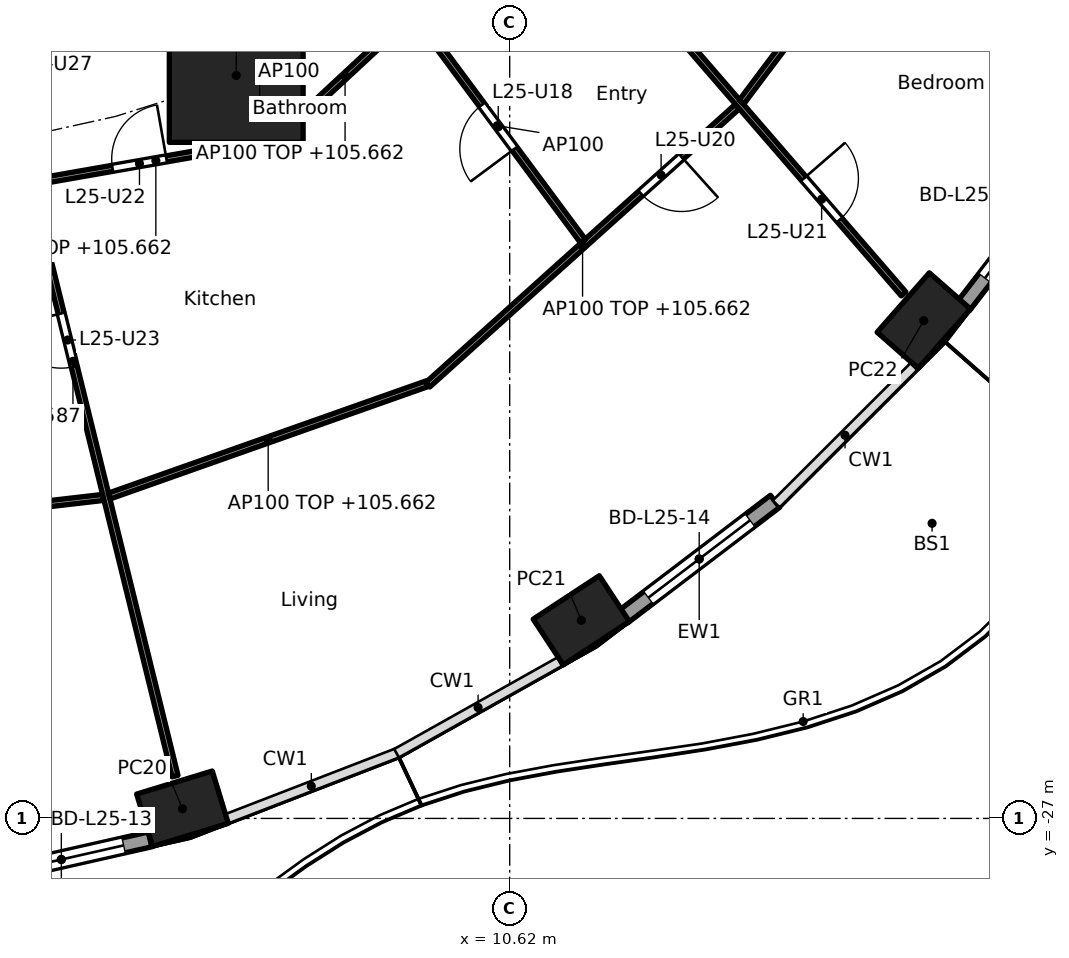
"""IFC4 building model, lengths in metres.
Left out: names, types, materials, properties, quantities, classifications, styles, units other than length and angle.
Written with IfcOpenShell. Run it as: python <this file> out.ifc"""

import sys

from ifc_helpers import new_model, si_unit, direction, frame, frame_2d, origin, origin_2d, place, context, subcontext, project, spatial, rectangle, hollow_rectangle, extrude, element, fill, save


model = new_model("IFC4")
c1 = context("Model", 3, precision=1e-05, world=origin(), true_north=direction((0.0, 1.0)))
c2 = subcontext(c1, "Body", "Model", "MODEL_VIEW")
j1 = project(units=[si_unit("LENGTHUNIT", "METRE"), si_unit("PLANEANGLEUNIT", "RADIAN")], contexts=[c1])
p1 = place(None, origin())
s1 = spatial("IfcSite", under=j1, at=p1, CompositionType="ELEMENT")
p2 = place(p1, origin())
s2 = spatial("IfcBuilding", under=s1, at=p2, CompositionType="ELEMENT")
p3 = place(p2, frame((0.0, 0.0, 102.9)))
s3 = spatial("IfcBuildingStorey", under=s2, at=p3, CompositionType="ELEMENT", Elevation=102.9)
for number, where, z_axis, x_axis in (
    (1, (5.239, -26.841, 0.0), (0.0, 0.0, 1.0), (0.957, 0.292, 0.0)),
    (2, (11.798, -23.742, 0.0), (0.0, 0.0, 1.0), (0.836, 0.549, 0.0)),
    (3, (17.43, -18.813, 0.0), (0.0, 0.0, 1.0), (0.66, 0.751, 0.0)),
):
    element("IfcColumn", number, at=place(p3, frame(where, z_axis=z_axis, x_axis=x_axis)), inside=s3, PredefinedType="COLUMN", context=c2, shape_type="SweptSolid", body=[
        extrude(hollow_rectangle(XDim=1.3, YDim=0.9, WallThickness=0.045, at=origin_2d()), origin(), (0.0, 0.0, 1.0), 3.7),
    ])
p4 = place(p3, frame((6.123, -14.782, 0.0), z_axis=(0.0, 0.0, 1.0), x_axis=(1.0, 0.0, 0.0)))
e4 = element("IfcColumn", 4, at=p4, inside=s3, PredefinedType="COLUMN", context=c2, shape_type="SweptSolid", body=[
    extrude(rectangle(XDim=2.2, YDim=2.2, at=origin_2d()), origin(), (0.0, 0.0, 1.0), 3.7),
])
p5 = place(p3, frame((4.707, -27.345, 0.0), z_axis=(0.0, 0.0, 1.0), x_axis=(-0.975317607872, -0.220806620767, 0.0)))
e5 = element("IfcWall", 5, at=p5, inside=s3, PredefinedType="SOLIDWALL", context=c2, shape_type="SweptSolid", body=[
    extrude(rectangle(XDim=2.993, YDim=0.25, at=frame_2d((1.497, 0.0))), origin(), (0.0, 0.0, 1.0), 3.44),
])
p6 = place(p5, frame((0.447, 0.0, 0.0)))
e6 = element("IfcOpeningElement", 6, at=p6, cuts=e5, PredefinedType="OPENING", context=c2, shape_type="SweptSolid", body=[
    extrude(rectangle(XDim=2.1, YDim=2.4, at=frame_2d((1.05, 1.2))), frame((0.0, 0.135, 0.0), z_axis=(0.0, -1.0, 0.0), x_axis=(1.0, 0.0, 0.0)), (0.0, 0.0, 1.0), 0.27),
])
p7 = place(p3, frame((14.984, -21.785, 0.0), z_axis=(0.0, 0.0, 1.0), x_axis=(-0.796037575978, -0.605247203736, 0.0)))
e7 = element("IfcWall", 7, at=p7, inside=s3, PredefinedType="SOLIDWALL", context=c2, shape_type="SweptSolid", body=[
    extrude(rectangle(XDim=3.134, YDim=0.25, at=frame_2d((1.567, 0.0))), origin(), (0.0, 0.0, 1.0), 3.44),
])
p8 = place(p7, frame((0.517, 0.0, 0.0)))
e8 = element("IfcOpeningElement", 8, at=p8, cuts=e7, PredefinedType="OPENING", context=c2, shape_type="SweptSolid", body=[
    extrude(rectangle(XDim=2.1, YDim=2.4, at=frame_2d((1.05, 1.2))), frame((0.0, 0.135, 0.0), z_axis=(0.0, -1.0, 0.0), x_axis=(1.0, 0.0, 0.0)), (0.0, 0.0, 1.0), 0.27),
])
p9 = place(p3, frame((20.073, -15.991, 0.0), z_axis=(0.0, 0.0, 1.0), x_axis=(-0.610458970322, -0.792047880847, 0.0)))
e9 = element("IfcWall", 9, at=p9, inside=s3, PredefinedType="SOLIDWALL", context=c2, shape_type="SweptSolid", body=[
    extrude(rectangle(XDim=3.263, YDim=0.25, at=frame_2d((1.631, 0.0))), origin(), (0.0, 0.0, 1.0), 3.44),
])
p10 = place(p9, frame((0.582, 0.0, 0.0)))
e10 = element("IfcOpeningElement", 10, at=p10, cuts=e9, PredefinedType="OPENING", context=c2, shape_type="SweptSolid", body=[
    extrude(rectangle(XDim=2.1, YDim=2.4, at=frame_2d((1.05, 1.2))), frame((0.0, 0.135, 0.0), z_axis=(0.0, -1.0, 0.0), x_axis=(1.0, 0.0, 0.0)), (0.0, 0.0, 1.0), 0.27),
])
p11 = place(p3, frame((-1.726, -22.375, 0.0), z_axis=(0.0, 0.0, 1.0), x_axis=(0.99339223329, 0.114768771187, 0.0)))
e11 = element("IfcWall", 11, at=p11, inside=s3, PredefinedType="PARTITIONING", context=c2, shape_type="SweptSolid", body=[
    extrude(rectangle(XDim=5.701, YDim=0.1, at=frame_2d((2.851, 0.0))), origin(), (0.0, 0.0, 1.0), 2.762),
])
p12 = place(p11, frame((2.4, 0.0, 0.0)))
e12 = element("IfcOpeningElement", 12, at=p12, cuts=e11, PredefinedType="OPENING", context=c2, shape_type="SweptSolid", body=[
    extrude(rectangle(XDim=0.9, YDim=2.1, at=frame_2d((0.45, 1.05))), frame((0.0, 0.06, 0.0), z_axis=(0.0, -1.0, 0.0), x_axis=(1.0, 0.0, 0.0)), (0.0, 0.0, 1.0), 0.12),
])
p13 = place(p3, frame((1.759, -12.662, 0.0), z_axis=(0.0, 0.0, 1.0), x_axis=(0.239021819854, -0.971014196412, 0.0)))
e13 = element("IfcWall", 13, at=p13, inside=s3, PredefinedType="PARTITIONING", context=c2, shape_type="SweptSolid", body=[
    extrude(rectangle(XDim=14.05, YDim=0.1, at=frame_2d((7.025, 0.0))), origin(), (0.0, 0.0, 1.0), 2.687),
])
p14 = place(p13, frame((6.214, 0.0, 0.0)))
e14 = element("IfcOpeningElement", 14, at=p14, cuts=e13, PredefinedType="OPENING", context=c2, shape_type="SweptSolid", body=[
    extrude(rectangle(XDim=0.9, YDim=2.1, at=frame_2d((0.45, 1.05))), frame((0.0, 0.06, 0.0), z_axis=(0.0, -1.0, 0.0), x_axis=(1.0, 0.0, 0.0)), (0.0, 0.0, 1.0), 0.12),
])
p15 = place(p13, frame((1.552, 0.0, 0.0)))
e15 = element("IfcOpeningElement", 15, at=p15, cuts=e13, PredefinedType="OPENING", context=c2, shape_type="SweptSolid", body=[
    extrude(rectangle(XDim=0.9, YDim=2.1, at=frame_2d((0.45, 1.05))), frame((0.0, 0.06, 0.0), z_axis=(0.0, -1.0, 0.0), x_axis=(1.0, 0.0, 0.0)), (0.0, 0.0, 1.0), 0.12),
])
p16 = place(p3, frame((2.765, -16.541, 0.0), z_axis=(0.0, 0.0, 1.0), x_axis=(0.984998612286, 0.172562260633, 0.0)))
e16 = element("IfcWall", 16, at=p16, inside=s3, PredefinedType="PARTITIONING", context=c2, shape_type="SweptSolid", body=[
    extrude(rectangle(XDim=4.134, YDim=0.1, at=frame_2d((2.067, 0.0))), origin(), (0.0, 0.0, 1.0), 2.762),
])
p17 = place(p16, frame((1.344, 0.0, 0.0)))
e17 = element("IfcOpeningElement", 17, at=p17, cuts=e16, PredefinedType="OPENING", context=c2, shape_type="SweptSolid", body=[
    extrude(rectangle(XDim=0.9, YDim=2.1, at=frame_2d((0.45, 1.05))), frame((0.0, 0.06, 0.0), z_axis=(0.0, -1.0, 0.0), x_axis=(1.0, 0.0, 0.0)), (0.0, 0.0, 1.0), 0.12),
])
p18 = place(p3, frame((4.034, -21.698, 0.0), z_axis=(0.0, 0.0, 1.0), x_axis=(0.942864271692, 0.333177077794, 0.0)))
e18 = element("IfcWall", 18, at=p18, inside=s3, PredefinedType="PARTITIONING", context=c2, shape_type="SweptSolid", body=[
    extrude(rectangle(XDim=5.545, YDim=0.1, at=frame_2d((2.772, 0.0))), origin(), (0.0, 0.0, 1.0), 2.762),
])
p19 = place(p3, frame((5.243, -12.657, 0.0), z_axis=(0.0, 0.0, 1.0), x_axis=(0.382719158442, -0.923864733477, 0.0)))
e19 = element("IfcWall", 19, at=p19, inside=s3, PredefinedType="PARTITIONING", context=c2, shape_type="SweptSolid", body=[
    extrude(rectangle(XDim=2.25, YDim=0.1, at=frame_2d((1.125, 0.0))), origin(), (0.0, 0.0, 1.0), 3.44),
])
p20 = place(p3, frame((6.824, -15.802, 0.0), z_axis=(0.0, 0.0, 1.0), x_axis=(0.733007232109, 0.680220844782, 0.0)))
e20 = element("IfcWall", 20, at=p20, inside=s3, PredefinedType="PARTITIONING", context=c2, shape_type="SweptSolid", body=[
    extrude(rectangle(XDim=2.969, YDim=0.1, at=frame_2d((1.485, 0.0))), origin(), (0.0, 0.0, 1.0), 2.762),
])
p21 = place(p3, frame((9.272, -19.868, 0.0), z_axis=(0.0, 0.0, 1.0), x_axis=(0.743884413566, 0.668308296562, 0.0)))
e21 = element("IfcWall", 21, at=p21, inside=s3, PredefinedType="PARTITIONING", context=c2, shape_type="SweptSolid", body=[
    extrude(rectangle(XDim=6.845, YDim=0.1, at=frame_2d((3.423, 0.0))), origin(), (0.0, 0.0, 1.0), 2.762),
])
p22 = place(p21, frame((4.709, 0.0, 0.0)))
e22 = element("IfcOpeningElement", 22, at=p22, cuts=e21, PredefinedType="OPENING", context=c2, shape_type="SweptSolid", body=[
    extrude(rectangle(XDim=0.9, YDim=2.1, at=frame_2d((0.45, 1.05))), frame((0.0, 0.06, 0.0), z_axis=(0.0, -1.0, 0.0), x_axis=(1.0, 0.0, 0.0)), (0.0, 0.0, 1.0), 0.12),
])
p23 = place(p3, frame((9.008, -13.708, 0.0), z_axis=(0.0, 0.0, 1.0), x_axis=(0.595845850207, -0.803098825047, 0.0)))
e23 = element("IfcWall", 23, at=p23, inside=s3, PredefinedType="PARTITIONING", context=c2, shape_type="SweptSolid", body=[
    extrude(rectangle(XDim=4.729, YDim=0.1, at=frame_2d((2.365, 0.0))), origin(), (0.0, 0.0, 1.0), 3.44),
])
p24 = place(p23, frame((1.94, 0.0, 0.0)))
e24 = element("IfcOpeningElement", 24, at=p24, cuts=e23, PredefinedType="OPENING", context=c2, shape_type="SweptSolid", body=[
    extrude(rectangle(XDim=0.9, YDim=2.1, at=frame_2d((0.45, 1.05))), frame((0.0, 0.06, 0.0), z_axis=(0.0, -1.0, 0.0), x_axis=(1.0, 0.0, 0.0)), (0.0, 0.0, 1.0), 0.12),
])
p25 = place(p3, frame((8.95, -8.96, 0.0), z_axis=(0.0, 0.0, 1.0), x_axis=(0.65441081073, -0.756139200676, 0.0)))
e25 = element("IfcWall", 25, at=p25, inside=s3, PredefinedType="PARTITIONING", context=c2, shape_type="SweptSolid", body=[
    extrude(rectangle(XDim=12.451, YDim=0.1, at=frame_2d((6.226, 0.0))), origin(), (0.0, 0.0, 1.0), 2.687),
])
p26 = place(p25, frame((1.336, 0.0, 0.0)))
e26 = element("IfcOpeningElement", 26, at=p26, cuts=e25, PredefinedType="OPENING", context=c2, shape_type="SweptSolid", body=[
    extrude(rectangle(XDim=0.9, YDim=2.1, at=frame_2d((0.45, 1.05))), frame((0.0, 0.06, 0.0), z_axis=(0.0, -1.0, 0.0), x_axis=(1.0, 0.0, 0.0)), (0.0, 0.0, 1.0), 0.12),
])
p27 = place(p25, frame((5.501, 0.0, 0.0)))
e27 = element("IfcOpeningElement", 27, at=p27, cuts=e25, PredefinedType="OPENING", context=c2, shape_type="SweptSolid", body=[
    extrude(rectangle(XDim=0.9, YDim=2.1, at=frame_2d((0.45, 1.05))), frame((0.0, 0.06, 0.0), z_axis=(0.0, -1.0, 0.0), x_axis=(1.0, 0.0, 0.0)), (0.0, 0.0, 1.0), 0.12),
])
p28 = place(p25, frame((9.941, 0.0, 0.0)))
e28 = element("IfcOpeningElement", 28, at=p28, cuts=e25, PredefinedType="OPENING", context=c2, shape_type="SweptSolid", body=[
    extrude(rectangle(XDim=0.9, YDim=2.1, at=frame_2d((0.45, 1.05))), frame((0.0, 0.06, 0.0), z_axis=(0.0, -1.0, 0.0), x_axis=(1.0, 0.0, 0.0)), (0.0, 0.0, 1.0), 0.12),
])
p29 = place(p3, frame((14.432, -15.219, 0.0), z_axis=(0.0, 0.0, 1.0), x_axis=(0.601001256685, 0.799248077548, 0.0)))
e29 = element("IfcWall", 29, at=p29, inside=s3, PredefinedType="PARTITIONING", context=c2, shape_type="SweptSolid", body=[
    extrude(rectangle(XDim=6.98, YDim=0.1, at=frame_2d((3.49, 0.0))), origin(), (0.0, 0.0, 1.0), 2.762),
])
p30 = place(p29, frame((4.798, 0.0, 0.0)))
e30 = element("IfcOpeningElement", 30, at=p30, cuts=e29, PredefinedType="OPENING", context=c2, shape_type="SweptSolid", body=[
    extrude(rectangle(XDim=0.9, YDim=2.1, at=frame_2d((0.45, 1.05))), frame((0.0, 0.06, 0.0), z_axis=(0.0, -1.0, 0.0), x_axis=(1.0, 0.0, 0.0)), (0.0, 0.0, 1.0), 0.12),
])
p31 = place(p3, frame((6.781, -15.638, 0.0), z_axis=(0.0, 0.0, 1.0), x_axis=(-0.533419461524, 0.845850860417, 0.0)))
e31 = element("IfcWall", 31, at=p31, inside=s3, PredefinedType="PARTITIONING", context=c2, shape_type="SweptSolid", body=[
    extrude(rectangle(XDim=1.025, YDim=0.1, at=frame_2d((0.513, 0.0))), origin(), (0.0, 0.0, 1.0), 3.44),
])
p32 = place(p6, origin())
e32 = element("IfcDoor", 32, at=p32, inside=s3, OperationType="SLIDING_TO_LEFT", PredefinedType="DOOR", context=c2, shape_type="SweptSolid", body=[
    extrude(rectangle(XDim=2.1, YDim=2.4, at=frame_2d((1.05, 1.2))), frame((0.0, 0.025, 0.0), z_axis=(0.0, -1.0, 0.0), x_axis=(1.0, 0.0, 0.0)), (0.0, 0.0, 1.0), 0.05),
])
fill(e6, e32)
p33 = place(p8, origin())
e33 = element("IfcDoor", 33, at=p33, inside=s3, OperationType="SLIDING_TO_LEFT", PredefinedType="DOOR", context=c2, shape_type="SweptSolid", body=[
    extrude(rectangle(XDim=2.1, YDim=2.4, at=frame_2d((1.05, 1.2))), frame((0.0, 0.025, 0.0), z_axis=(0.0, -1.0, 0.0), x_axis=(1.0, 0.0, 0.0)), (0.0, 0.0, 1.0), 0.05),
])
fill(e8, e33)
p34 = place(p10, origin())
e34 = element("IfcDoor", 34, at=p34, inside=s3, OperationType="SLIDING_TO_LEFT", PredefinedType="DOOR", context=c2, shape_type="SweptSolid", body=[
    extrude(rectangle(XDim=2.1, YDim=2.4, at=frame_2d((1.05, 1.2))), frame((0.0, 0.025, 0.0), z_axis=(0.0, -1.0, 0.0), x_axis=(1.0, 0.0, 0.0)), (0.0, 0.0, 1.0), 0.05),
])
fill(e10, e34)
p35 = place(p24, frame((0.9, 0.0, 0.0), x_axis=(-1.0, 0.0, 0.0)))
e35 = element("IfcDoor", 35, at=p35, inside=s3, OperationType="SINGLE_SWING_LEFT", PredefinedType="DOOR", context=c2, shape_type="SweptSolid", body=[
    extrude(rectangle(XDim=0.9, YDim=2.1, at=frame_2d((0.45, 1.05))), frame((0.0, 0.025, 0.0), z_axis=(0.0, -1.0, 0.0), x_axis=(1.0, 0.0, 0.0)), (0.0, 0.0, 1.0), 0.05),
])
fill(e24, e35)
p36 = place(p22, frame((0.9, 0.0, 0.0), x_axis=(-1.0, 0.0, 0.0)))
e36 = element("IfcDoor", 36, at=p36, inside=s3, OperationType="SINGLE_SWING_LEFT", PredefinedType="DOOR", context=c2, shape_type="SweptSolid", body=[
    extrude(rectangle(XDim=0.9, YDim=2.1, at=frame_2d((0.45, 1.05))), frame((0.0, 0.025, 0.0), z_axis=(0.0, -1.0, 0.0), x_axis=(1.0, 0.0, 0.0)), (0.0, 0.0, 1.0), 0.05),
])
fill(e22, e36)
p37 = place(p28, origin())
e37 = element("IfcDoor", 37, at=p37, inside=s3, OperationType="SINGLE_SWING_LEFT", PredefinedType="DOOR", context=c2, shape_type="SweptSolid", body=[
    extrude(rectangle(XDim=0.9, YDim=2.1, at=frame_2d((0.45, 1.05))), frame((0.0, 0.025, 0.0), z_axis=(0.0, -1.0, 0.0), x_axis=(1.0, 0.0, 0.0)), (0.0, 0.0, 1.0), 0.05),
])
fill(e28, e37)
p38 = place(p17, origin())
e38 = element("IfcDoor", 38, at=p38, inside=s3, OperationType="SINGLE_SWING_RIGHT", PredefinedType="DOOR", context=c2, shape_type="SweptSolid", body=[
    extrude(rectangle(XDim=0.9, YDim=2.1, at=frame_2d((0.45, 1.05))), frame((0.0, 0.025, 0.0), z_axis=(0.0, -1.0, 0.0), x_axis=(1.0, 0.0, 0.0)), (0.0, 0.0, 1.0), 0.05),
])
fill(e17, e38)
p39 = place(p14, frame((0.9, 0.0, 0.0), x_axis=(-1.0, 0.0, 0.0)))
e39 = element("IfcDoor", 39, at=p39, inside=s3, OperationType="SINGLE_SWING_RIGHT", PredefinedType="DOOR", context=c2, shape_type="SweptSolid", body=[
    extrude(rectangle(XDim=0.9, YDim=2.1, at=frame_2d((0.45, 1.05))), frame((0.0, 0.025, 0.0), z_axis=(0.0, -1.0, 0.0), x_axis=(1.0, 0.0, 0.0)), (0.0, 0.0, 1.0), 0.05),
])
fill(e14, e39)
save(model, sys.argv[1])
